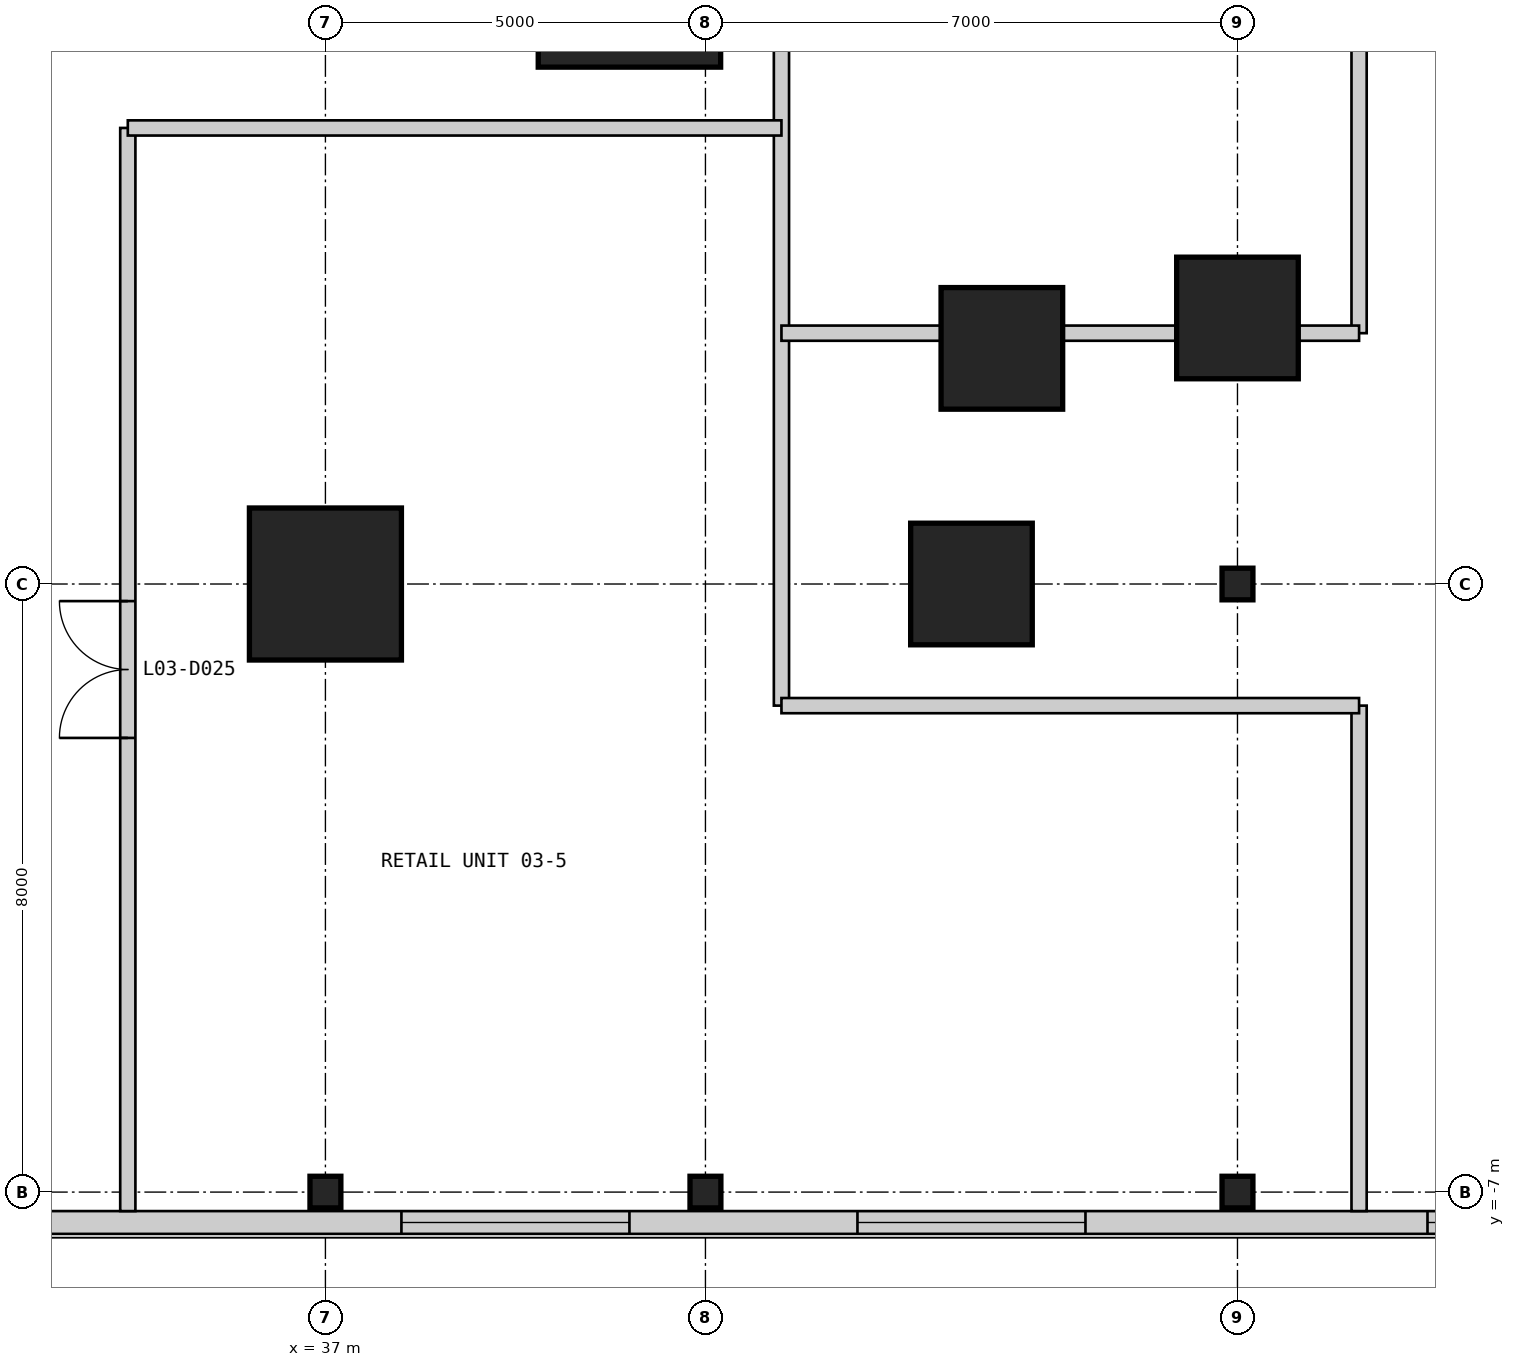
"""IFC4 building model, lengths in metres.
Left out: names, types, materials, properties, quantities, classifications, styles, units other than length and angle.
Written with IfcOpenShell. Run it as: python <this file> out.ifc"""

import sys

from ifc_helpers import new_model, si_unit, direction, frame, frame_2d, origin, origin_2d, place, context, subcontext, project, spatial, rectangle, i_section, extrude, element, fill, save


model = new_model("IFC4")
c1 = context("Model", 3, precision=1e-05, world=origin(), true_north=direction((0.0, 1.0)))
c2 = subcontext(c1, "Body", "Model", "MODEL_VIEW")
j1 = project(units=[si_unit("LENGTHUNIT", "METRE"), si_unit("PLANEANGLEUNIT", "RADIAN")], contexts=[c1])
p1 = place(None, origin())
s1 = spatial("IfcSite", under=j1, at=p1, CompositionType="ELEMENT")
p2 = place(p1, origin())
s2 = spatial("IfcBuilding", under=s1, at=p2, CompositionType="ELEMENT")
p3 = place(p2, frame((0.0, 0.0, 16.6)))
s3 = spatial("IfcBuildingStorey", under=s2, at=p3, CompositionType="ELEMENT", Elevation=16.6)
p4 = place(p3, frame((41.0, 9.0, 0.0), z_axis=(0.0, 0.0, 1.0), x_axis=(1.0, 0.0, 0.0)))
e1 = element("IfcColumn", 1, at=p4, inside=s3, PredefinedType="COLUMN", context=c2, shape_type="SweptSolid", body=[
    extrude(rectangle(XDim=2.4, YDim=2.4, at=origin_2d()), origin(), (0.0, 0.0, 1.0), 4.8),
])
p5 = place(p3, frame((37.0, 1.0, 0.0), z_axis=(0.0, 0.0, 1.0), x_axis=(1.0, 0.0, 0.0)))
e2 = element("IfcColumn", 2, at=p5, inside=s3, PredefinedType="COLUMN", context=c2, shape_type="SweptSolid", body=[
    extrude(rectangle(XDim=2.0, YDim=2.0, at=origin_2d()), origin(), (0.0, 0.0, 1.0), 4.8),
])
for number, where, z_axis, x_axis in (
    (3, (45.5, 1.0, 0.0), (0.0, 0.0, 1.0), (1.0, 0.0, 0.0)),
    (4, (45.9, 4.1, 0.0), (0.0, 0.0, 1.0), (1.0, 0.0, 0.0)),
    (5, (49.0, 4.5, 0.0), (0.0, 0.0, 1.0), (1.0, 0.0, 0.0)),
):
    element("IfcColumn", number, at=place(p3, frame(where, z_axis=z_axis, x_axis=x_axis)), inside=s3, PredefinedType="COLUMN", context=c2, shape_type="SweptSolid", body=[
        extrude(rectangle(XDim=1.6, YDim=1.6, at=origin_2d()), origin(), (0.0, 0.0, 1.0), 4.8),
    ])
for number, where, z_axis, x_axis in (
    (6, (37.0, -7.0, 0.0), (0.0, 0.0, 1.0), (1.0, 0.0, 0.0)),
    (7, (42.0, -7.0, 0.0), (0.0, 0.0, 1.0), (1.0, 0.0, 0.0)),
    (8, (49.0, -7.0, 0.0), (0.0, 0.0, 1.0), (1.0, 0.0, 0.0)),
    (9, (49.0, 1.0, 0.0), (0.0, 0.0, 1.0), (1.0, 0.0, 0.0)),
):
    element("IfcColumn", number, at=place(p3, frame(where, z_axis=z_axis, x_axis=x_axis)), inside=s3, PredefinedType="COLUMN", context=c2, shape_type="SweptSolid", body=[
        extrude(i_section(OverallWidth=0.406, OverallDepth=0.417, WebThickness=0.03, FlangeThickness=0.048, at=origin_2d()), origin(), (0.0, 0.0, 1.0), 4.8),
    ])
p6 = place(p3, frame((-15.55, -7.4, 0.0), z_axis=(0.0, 0.0, 1.0), x_axis=(1.0, 0.0, 0.0)))
e10 = element("IfcWall", 10, at=p6, inside=s3, PredefinedType="SOLIDWALL", context=c2, shape_type="SweptSolid", body=[
    extrude(rectangle(XDim=73.1, YDim=0.3, at=frame_2d((36.55, 0.0))), origin(), (0.0, 0.0, 1.0), 4.5),
])
p7 = place(p6, frame((3.05, 0.0, 0.9)))
e11 = element("IfcOpeningElement", 11, at=p7, cuts=e10, PredefinedType="OPENING", context=c2, shape_type="SweptSolid", body=[
    extrude(rectangle(XDim=3.0, YDim=2.4, at=frame_2d((1.5, 1.2))), frame((0.0, 0.16, 0.0), z_axis=(0.0, -1.0, 0.0), x_axis=(1.0, 0.0, 0.0)), (0.0, 0.0, 1.0), 0.32),
])
p8 = place(p6, frame((11.05, 0.0, 0.9)))
e12 = element("IfcOpeningElement", 12, at=p8, cuts=e10, PredefinedType="OPENING", context=c2, shape_type="SweptSolid", body=[
    extrude(rectangle(XDim=3.0, YDim=2.4, at=frame_2d((1.5, 1.2))), frame((0.0, 0.16, 0.0), z_axis=(0.0, -1.0, 0.0), x_axis=(1.0, 0.0, 0.0)), (0.0, 0.0, 1.0), 0.32),
])
p9 = place(p6, frame((19.05, 0.0, 0.9)))
e13 = element("IfcOpeningElement", 13, at=p9, cuts=e10, PredefinedType="OPENING", context=c2, shape_type="SweptSolid", body=[
    extrude(rectangle(XDim=3.0, YDim=2.4, at=frame_2d((1.5, 1.2))), frame((0.0, 0.16, 0.0), z_axis=(0.0, -1.0, 0.0), x_axis=(1.0, 0.0, 0.0)), (0.0, 0.0, 1.0), 0.32),
])
p10 = place(p6, frame((33.05, 0.0, 0.9)))
e14 = element("IfcOpeningElement", 14, at=p10, cuts=e10, PredefinedType="OPENING", context=c2, shape_type="SweptSolid", body=[
    extrude(rectangle(XDim=3.0, YDim=2.4, at=frame_2d((1.5, 1.2))), frame((0.0, 0.16, 0.0), z_axis=(0.0, -1.0, 0.0), x_axis=(1.0, 0.0, 0.0)), (0.0, 0.0, 1.0), 0.32),
])
p11 = place(p6, frame((45.05, 0.0, 0.9)))
e15 = element("IfcOpeningElement", 15, at=p11, cuts=e10, PredefinedType="OPENING", context=c2, shape_type="SweptSolid", body=[
    extrude(rectangle(XDim=3.0, YDim=2.4, at=frame_2d((1.5, 1.2))), frame((0.0, 0.16, 0.0), z_axis=(0.0, -1.0, 0.0), x_axis=(1.0, 0.0, 0.0)), (0.0, 0.0, 1.0), 0.32),
])
p12 = place(p6, frame((53.55, 0.0, 0.9)))
e16 = element("IfcOpeningElement", 16, at=p12, cuts=e10, PredefinedType="OPENING", context=c2, shape_type="SweptSolid", body=[
    extrude(rectangle(XDim=3.0, YDim=2.4, at=frame_2d((1.5, 1.2))), frame((0.0, 0.16, 0.0), z_axis=(0.0, -1.0, 0.0), x_axis=(1.0, 0.0, 0.0)), (0.0, 0.0, 1.0), 0.32),
])
p13 = place(p6, frame((59.55, 0.0, 0.9)))
e17 = element("IfcOpeningElement", 17, at=p13, cuts=e10, PredefinedType="OPENING", context=c2, shape_type="SweptSolid", body=[
    extrude(rectangle(XDim=3.0, YDim=2.4, at=frame_2d((1.5, 1.2))), frame((0.0, 0.16, 0.0), z_axis=(0.0, -1.0, 0.0), x_axis=(1.0, 0.0, 0.0)), (0.0, 0.0, 1.0), 0.32),
])
p14 = place(p6, frame((67.05, 0.0, 0.9)))
e18 = element("IfcOpeningElement", 18, at=p14, cuts=e10, PredefinedType="OPENING", context=c2, shape_type="SweptSolid", body=[
    extrude(rectangle(XDim=3.0, YDim=2.4, at=frame_2d((1.5, 1.2))), frame((0.0, 0.16, 0.0), z_axis=(0.0, -1.0, 0.0), x_axis=(1.0, 0.0, 0.0)), (0.0, 0.0, 1.0), 0.32),
])
p15 = place(p3, frame((34.4, -7.25, 0.0), z_axis=(0.0, 0.0, 1.0), x_axis=(0.0, 1.0, 0.0)))
e19 = element("IfcWall", 19, at=p15, inside=s3, PredefinedType="PARTITIONING", context=c2, shape_type="SweptSolid", body=[
    extrude(rectangle(XDim=14.25, YDim=0.2, at=frame_2d((7.125, 0.0))), origin(), (0.0, 0.0, 1.0), 4.5),
])
p16 = place(p15, frame((6.225, 0.0, 0.0)))
e20 = element("IfcOpeningElement", 20, at=p16, cuts=e19, PredefinedType="OPENING", context=c2, shape_type="SweptSolid", body=[
    extrude(rectangle(XDim=1.8, YDim=2.4, at=frame_2d((0.9, 1.2))), frame((0.0, 0.11, 0.0), z_axis=(0.0, -1.0, 0.0), x_axis=(1.0, 0.0, 0.0)), (0.0, 0.0, 1.0), 0.22),
])
p17 = place(p3, frame((43.0, -0.6, 0.0), z_axis=(0.0, 0.0, 1.0), x_axis=(0.0, 1.0, 0.0)))
e21 = element("IfcWall", 21, at=p17, inside=s3, PredefinedType="PARTITIONING", context=c2, shape_type="SweptSolid", body=[
    extrude(rectangle(XDim=28.6, YDim=0.2, at=frame_2d((14.3, 0.0))), origin(), (0.0, 0.0, 1.0), 3.843),
])
p18 = place(p3, frame((50.6, -7.25, 0.0), z_axis=(0.0, 0.0, 1.0), x_axis=(0.0, 1.0, 0.0)))
e22 = element("IfcWall", 22, at=p18, inside=s3, PredefinedType="PARTITIONING", context=c2, shape_type="SweptSolid", body=[
    extrude(rectangle(XDim=6.65, YDim=0.2, at=frame_2d((3.325, 0.0))), origin(), (0.0, 0.0, 1.0), 4.5),
])
p19 = place(p3, frame((50.6, 4.3, 0.0), z_axis=(0.0, 0.0, 1.0), x_axis=(0.0, 1.0, 0.0)))
e23 = element("IfcWall", 23, at=p19, inside=s3, PredefinedType="PARTITIONING", context=c2, shape_type="SweptSolid", body=[
    extrude(rectangle(XDim=11.3, YDim=0.2, at=frame_2d((5.65, 0.0))), origin(), (0.0, 0.0, 1.0), 4.5),
])
p20 = place(p3, frame((43.0, -0.6, 0.0), z_axis=(0.0, 0.0, 1.0), x_axis=(1.0, 0.0, 0.0)))
e24 = element("IfcWall", 24, at=p20, inside=s3, PredefinedType="PARTITIONING", context=c2, shape_type="SweptSolid", body=[
    extrude(rectangle(XDim=7.6, YDim=0.2, at=frame_2d((3.8, 0.0))), origin(), (0.0, 0.0, 1.0), 4.5),
])
p21 = place(p3, frame((43.0, 4.3, 0.0), z_axis=(0.0, 0.0, 1.0), x_axis=(1.0, 0.0, 0.0)))
e25 = element("IfcWall", 25, at=p21, inside=s3, PredefinedType="PARTITIONING", context=c2, shape_type="SweptSolid", body=[
    extrude(rectangle(XDim=2.1, YDim=0.2, at=frame_2d((1.05, 0.0))), origin(), (0.0, 0.0, 1.0), 4.5),
])
p22 = place(p3, frame((46.7, 4.3, 0.0), z_axis=(0.0, 0.0, 1.0), x_axis=(1.0, 0.0, 0.0)))
e26 = element("IfcWall", 26, at=p22, inside=s3, PredefinedType="PARTITIONING", context=c2, shape_type="SweptSolid", body=[
    extrude(rectangle(XDim=1.5, YDim=0.2, at=frame_2d((0.75, 0.0))), origin(), (0.0, 0.0, 1.0), 3.65),
])
p23 = place(p3, frame((49.8, 4.3, 0.0), z_axis=(0.0, 0.0, 1.0), x_axis=(1.0, 0.0, 0.0)))
e27 = element("IfcWall", 27, at=p23, inside=s3, PredefinedType="PARTITIONING", context=c2, shape_type="SweptSolid", body=[
    extrude(rectangle(XDim=0.8, YDim=0.2, at=frame_2d((0.4, 0.0))), origin(), (0.0, 0.0, 1.0), 4.5),
])
p24 = place(p3, frame((34.4, 7.0, 0.0), z_axis=(0.0, 0.0, 1.0), x_axis=(1.0, 0.0, 0.0)))
e28 = element("IfcWall", 28, at=p24, inside=s3, PredefinedType="PARTITIONING", context=c2, shape_type="SweptSolid", body=[
    extrude(rectangle(XDim=8.6, YDim=0.2, at=frame_2d((4.3, 0.0))), origin(), (0.0, 0.0, 1.0), 4.5),
])
p25 = place(p12, origin())
e29 = element("IfcWindow", 29, at=p25, inside=s3, PartitioningType="SINGLE_PANEL", PredefinedType="WINDOW", context=c2, shape_type="SweptSolid", body=[
    extrude(rectangle(XDim=3.0, YDim=2.4, at=frame_2d((1.5, 1.2))), frame((0.0, 0.03, 0.0), z_axis=(0.0, -1.0, 0.0), x_axis=(1.0, 0.0, 0.0)), (0.0, 0.0, 1.0), 0.06),
])
fill(e16, e29)
p26 = place(p13, origin())
e30 = element("IfcWindow", 30, at=p26, inside=s3, PartitioningType="SINGLE_PANEL", PredefinedType="WINDOW", context=c2, shape_type="SweptSolid", body=[
    extrude(rectangle(XDim=3.0, YDim=2.4, at=frame_2d((1.5, 1.2))), frame((0.0, 0.03, 0.0), z_axis=(0.0, -1.0, 0.0), x_axis=(1.0, 0.0, 0.0)), (0.0, 0.0, 1.0), 0.06),
])
fill(e17, e30)
p27 = place(p14, origin())
e31 = element("IfcWindow", 31, at=p27, inside=s3, PartitioningType="SINGLE_PANEL", PredefinedType="WINDOW", context=c2, shape_type="SweptSolid", body=[
    extrude(rectangle(XDim=3.0, YDim=2.4, at=frame_2d((1.5, 1.2))), frame((0.0, 0.03, 0.0), z_axis=(0.0, -1.0, 0.0), x_axis=(1.0, 0.0, 0.0)), (0.0, 0.0, 1.0), 0.06),
])
fill(e18, e31)
p28 = place(p16, origin())
e32 = element("IfcDoor", 32, at=p28, inside=s3, OperationType="DOUBLE_DOOR_SINGLE_SWING", PredefinedType="DOOR", context=c2, shape_type="SweptSolid", body=[
    extrude(rectangle(XDim=1.8, YDim=2.4, at=frame_2d((0.9, 1.2))), frame((0.0, 0.025, 0.0), z_axis=(0.0, -1.0, 0.0), x_axis=(1.0, 0.0, 0.0)), (0.0, 0.0, 1.0), 0.05),
])
fill(e20, e32)
save(model, sys.argv[1])
